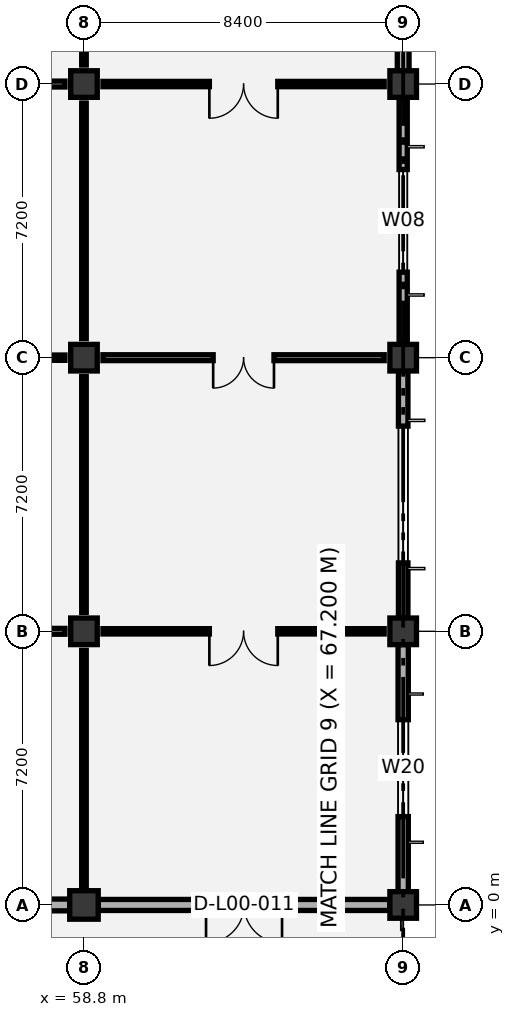
"""IFC4 building model, lengths in metres.
Left out: names, types, materials, properties, quantities, classifications, styles, units other than length and angle.
Written with IfcOpenShell. Run it as: python <this file> out.ifc"""

import sys

from ifc_helpers import new_model, si_unit, direction, frame, frame_2d, origin, origin_2d, place, context, subcontext, project, spatial, rectangle, circle, extrude, element, fill, save


model = new_model("IFC4")
c1 = context("Model", 3, precision=1e-05, world=origin(), true_north=direction((0.0, 1.0)))
c2 = subcontext(c1, "Body", "Model", "MODEL_VIEW")
j1 = project(units=[si_unit("LENGTHUNIT", "METRE"), si_unit("PLANEANGLEUNIT", "RADIAN")], contexts=[c1])
p1 = place(None, origin())
s1 = spatial("IfcSite", under=j1, at=p1, CompositionType="ELEMENT")
p2 = place(p1, origin())
s2 = spatial("IfcBuilding", under=s1, at=p2, CompositionType="ELEMENT")
p3 = place(p2, origin())
s3 = spatial("IfcBuildingStorey", under=s2, at=p3, CompositionType="ELEMENT", Elevation=0.0)
p4 = place(p3, frame((58.8, 0.0, 0.0), z_axis=(0.0, 0.0, 1.0), x_axis=(1.0, 0.0, 0.0)))
e1 = element("IfcColumn", 1, at=p4, inside=s3, PredefinedType="COLUMN", context=c2, shape_type="SweptSolid", body=[
    extrude(circle(Radius=0.375, at=origin_2d()), origin(), (0.0, 0.0, 1.0), 6.0),
])
for number, where, z_axis, x_axis in (
    (2, (58.8, 7.2, 0.0), (0.0, 0.0, 1.0), (1.0, 0.0, 0.0)),
    (3, (58.8, 14.4, 0.0), (0.0, 0.0, 1.0), (1.0, 0.0, 0.0)),
    (4, (58.8, 21.6, 0.0), (0.0, 0.0, 1.0), (1.0, 0.0, 0.0)),
    (5, (67.2, 0.0, 0.0), (0.0, 0.0, 1.0), (1.0, 0.0, 0.0)),
    (6, (67.2, 7.2, 0.0), (0.0, 0.0, 1.0), (1.0, 0.0, 0.0)),
    (7, (67.2, 14.4, 0.0), (0.0, 0.0, 1.0), (1.0, 0.0, 0.0)),
    (8, (67.2, 21.6, 0.0), (0.0, 0.0, 1.0), (1.0, 0.0, 0.0)),
):
    element("IfcColumn", number, at=place(p3, frame(where, z_axis=z_axis, x_axis=x_axis)), inside=s3, PredefinedType="COLUMN", context=c2, shape_type="SweptSolid", body=[
        extrude(rectangle(XDim=0.7, YDim=0.7, at=origin_2d()), origin(), (0.0, 0.0, 1.0), 6.0),
    ])
p5 = place(p3, frame((50.75, 0.0, 0.0), z_axis=(0.0, 0.0, 1.0), x_axis=(1.0, 0.0, 0.0)))
e9 = element("IfcWall", 9, at=p5, inside=s3, PredefinedType="SOLIDWALL", context=c2, shape_type="SweptSolid", body=[
    extrude(rectangle(XDim=7.675, YDim=0.31, at=frame_2d((3.837, 0.0))), origin(), (0.0, 0.0, 1.0), 5.02),
])
p6 = place(p5, frame((2.738, 0.0, 0.0)))
e10 = element("IfcOpeningElement", 10, at=p6, cuts=e9, PredefinedType="OPENING", context=c2, shape_type="SweptSolid", body=[
    extrude(rectangle(XDim=2.2, YDim=2.45, at=frame_2d((1.1, 1.225))), frame((0.0, 0.165, 0.0), z_axis=(0.0, -1.0, 0.0), x_axis=(1.0, 0.0, 0.0)), (0.0, 0.0, 1.0), 0.33),
])
p7 = place(p3, frame((59.175, 0.0, 0.0), z_axis=(0.0, 0.0, 1.0), x_axis=(1.0, 0.0, 0.0)))
e11 = element("IfcWall", 11, at=p7, inside=s3, PredefinedType="SOLIDWALL", context=c2, shape_type="SweptSolid", body=[
    extrude(rectangle(XDim=7.675, YDim=0.29, at=frame_2d((3.837, 0.0))), origin(), (0.0, 0.0, 1.0), 5.02),
])
p8 = place(p7, frame((2.837, 0.0, 0.0)))
e12 = element("IfcOpeningElement", 12, at=p8, cuts=e11, PredefinedType="OPENING", context=c2, shape_type="SweptSolid", body=[
    extrude(rectangle(XDim=2.0, YDim=2.4, at=frame_2d((1.0, 1.2))), frame((0.0, 0.155, 0.0), z_axis=(0.0, -1.0, 0.0), x_axis=(1.0, 0.0, 0.0)), (0.0, 0.0, 1.0), 0.31),
])
p9 = place(p3, frame((67.2, 0.35, 0.0), z_axis=(0.0, 0.0, 1.0), x_axis=(0.0, 1.0, 0.0)))
e13 = element("IfcWall", 13, at=p9, inside=s3, PredefinedType="SOLIDWALL", context=c2, shape_type="SweptSolid", body=[
    extrude(rectangle(XDim=6.5, YDim=0.27, at=frame_2d((3.25, 0.0))), origin(), (0.0, 0.0, 1.0), 5.02),
])
p10 = place(p9, frame((1.975, 0.0, 0.9)))
e14 = element("IfcOpeningElement", 14, at=p10, cuts=e13, PredefinedType="OPENING", context=c2, shape_type="SweptSolid", body=[
    extrude(rectangle(XDim=2.55, YDim=1.95, at=frame_2d((1.275, 0.975))), frame((0.0, 0.145, 0.0), z_axis=(0.0, -1.0, 0.0), x_axis=(1.0, 0.0, 0.0)), (0.0, 0.0, 1.0), 0.29),
])
p11 = place(p3, frame((67.2, 7.55, 0.0), z_axis=(0.0, 0.0, 1.0), x_axis=(0.0, 1.0, 0.0)))
e15 = element("IfcWall", 15, at=p11, inside=s3, PredefinedType="SOLIDWALL", context=c2, shape_type="SweptSolid", body=[
    extrude(rectangle(XDim=6.5, YDim=0.25, at=frame_2d((3.25, 0.0))), origin(), (0.0, 0.0, 1.0), 5.02),
])
p12 = place(p11, frame((1.45, 0.0, 0.9)))
e16 = element("IfcOpeningElement", 16, at=p12, cuts=e15, PredefinedType="OPENING", context=c2, shape_type="SweptSolid", body=[
    extrude(rectangle(XDim=3.6, YDim=2.4, at=frame_2d((1.8, 1.2))), frame((0.0, 0.135, 0.0), z_axis=(0.0, -1.0, 0.0), x_axis=(1.0, 0.0, 0.0)), (0.0, 0.0, 1.0), 0.27),
])
p13 = place(p3, frame((67.2, 14.75, 0.0), z_axis=(0.0, 0.0, 1.0), x_axis=(0.0, 1.0, 0.0)))
e17 = element("IfcWall", 17, at=p13, inside=s3, PredefinedType="SOLIDWALL", context=c2, shape_type="SweptSolid", body=[
    extrude(rectangle(XDim=6.5, YDim=0.215, at=frame_2d((3.25, 0.0))), origin(), (0.0, 0.0, 1.0), 5.02),
])
p14 = place(p13, frame((1.9, 0.0, 0.9)))
e18 = element("IfcOpeningElement", 18, at=p14, cuts=e17, PredefinedType="OPENING", context=c2, shape_type="SweptSolid", body=[
    extrude(rectangle(XDim=2.7, YDim=2.1, at=frame_2d((1.35, 1.05))), frame((0.0, 0.117, 0.0), z_axis=(0.0, -1.0, 0.0), x_axis=(1.0, 0.0, 0.0)), (0.0, 0.0, 1.0), 0.235),
])
p15 = place(p3, frame((67.2, 21.95, 0.0), z_axis=(0.0, 0.0, 1.0), x_axis=(0.0, 1.0, 0.0)))
e19 = element("IfcWall", 19, at=p15, inside=s3, PredefinedType="SOLIDWALL", context=c2, shape_type="SweptSolid", body=[
    extrude(rectangle(XDim=6.5, YDim=0.31, at=frame_2d((3.25, 0.0))), origin(), (0.0, 0.0, 1.0), 5.02),
])
p16 = place(p15, frame((1.825, 0.0, 0.9)))
e20 = element("IfcOpeningElement", 20, at=p16, cuts=e19, PredefinedType="OPENING", context=c2, shape_type="SweptSolid", body=[
    extrude(rectangle(XDim=2.85, YDim=1.95, at=frame_2d((1.425, 0.975))), frame((0.0, 0.165, 0.0), z_axis=(0.0, -1.0, 0.0), x_axis=(1.0, 0.0, 0.0)), (0.0, 0.0, 1.0), 0.33),
])
p17 = place(p3, frame((58.8, 0.5, 0.0), z_axis=(0.0, 0.0, 1.0), x_axis=(0.0, 1.0, 0.0)))
e21 = element("IfcWall", 21, at=p17, inside=s3, PredefinedType="PARTITIONING", context=c2, shape_type="SweptSolid", body=[
    extrude(rectangle(XDim=6.2, YDim=0.12, at=frame_2d((3.1, 0.0))), origin(), (0.0, 0.0, 1.0), 4.92),
])
p18 = place(p3, frame((50.9, 7.2, 0.0), z_axis=(0.0, 0.0, 1.0), x_axis=(1.0, 0.0, 0.0)))
e22 = element("IfcWall", 22, at=p18, inside=s3, PredefinedType="PARTITIONING", context=c2, shape_type="SweptSolid", body=[
    extrude(rectangle(XDim=7.4, YDim=0.155, at=frame_2d((3.7, 0.0))), origin(), (0.0, 0.0, 1.0), 4.87),
])
p19 = place(p18, frame((2.8, 0.0, 0.0)))
e23 = element("IfcOpeningElement", 23, at=p19, cuts=e22, PredefinedType="OPENING", context=c2, shape_type="SweptSolid", body=[
    extrude(rectangle(XDim=1.8, YDim=2.25, at=frame_2d((0.9, 1.125))), frame((0.0, 0.087, 0.0), z_axis=(0.0, -1.0, 0.0), x_axis=(1.0, 0.0, 0.0)), (0.0, 0.0, 1.0), 0.175),
])
p20 = place(p3, frame((58.8, 7.7, 0.0), z_axis=(0.0, 0.0, 1.0), x_axis=(0.0, 1.0, 0.0)))
e24 = element("IfcWall", 24, at=p20, inside=s3, PredefinedType="PARTITIONING", context=c2, shape_type="SweptSolid", body=[
    extrude(rectangle(XDim=6.2, YDim=0.12, at=frame_2d((3.1, 0.0))), origin(), (0.0, 0.0, 1.0), 5.38),
])
p21 = place(p3, frame((50.9, 14.4, 0.0), z_axis=(0.0, 0.0, 1.0), x_axis=(1.0, 0.0, 0.0)))
e25 = element("IfcWall", 25, at=p21, inside=s3, PredefinedType="PARTITIONING", context=c2, shape_type="SweptSolid", body=[
    extrude(rectangle(XDim=7.4, YDim=0.14, at=frame_2d((3.7, 0.0))), origin(), (0.0, 0.0, 1.0), 4.87),
])
p22 = place(p21, frame((2.9, 0.0, 0.0)))
e26 = element("IfcOpeningElement", 26, at=p22, cuts=e25, PredefinedType="OPENING", context=c2, shape_type="SweptSolid", body=[
    extrude(rectangle(XDim=1.6, YDim=2.2, at=frame_2d((0.8, 1.1))), frame((0.0, 0.08, 0.0), z_axis=(0.0, -1.0, 0.0), x_axis=(1.0, 0.0, 0.0)), (0.0, 0.0, 1.0), 0.16),
])
p23 = place(p3, frame((58.8, 14.9, 0.0), z_axis=(0.0, 0.0, 1.0), x_axis=(0.0, 1.0, 0.0)))
e27 = element("IfcWall", 27, at=p23, inside=s3, PredefinedType="PARTITIONING", context=c2, shape_type="SweptSolid", body=[
    extrude(rectangle(XDim=6.2, YDim=0.12, at=frame_2d((3.1, 0.0))), origin(), (0.0, 0.0, 1.0), 4.92),
])
p24 = place(p3, frame((50.9, 21.6, 0.0), z_axis=(0.0, 0.0, 1.0), x_axis=(1.0, 0.0, 0.0)))
e28 = element("IfcWall", 28, at=p24, inside=s3, PredefinedType="PARTITIONING", context=c2, shape_type="SweptSolid", body=[
    extrude(rectangle(XDim=7.4, YDim=0.155, at=frame_2d((3.7, 0.0))), origin(), (0.0, 0.0, 1.0), 4.87),
])
p25 = place(p24, frame((2.8, 0.0, 0.0)))
e29 = element("IfcOpeningElement", 29, at=p25, cuts=e28, PredefinedType="OPENING", context=c2, shape_type="SweptSolid", body=[
    extrude(rectangle(XDim=1.8, YDim=2.25, at=frame_2d((0.9, 1.125))), frame((0.0, 0.087, 0.0), z_axis=(0.0, -1.0, 0.0), x_axis=(1.0, 0.0, 0.0)), (0.0, 0.0, 1.0), 0.175),
])
p26 = place(p3, frame((58.8, 22.1, 0.0), z_axis=(0.0, 0.0, 1.0), x_axis=(0.0, 1.0, 0.0)))
e30 = element("IfcWall", 30, at=p26, inside=s3, PredefinedType="PARTITIONING", context=c2, shape_type="SweptSolid", body=[
    extrude(rectangle(XDim=6.2, YDim=0.12, at=frame_2d((3.1, 0.0))), origin(), (0.0, 0.0, 1.0), 5.17),
])
p27 = place(p3, frame((59.3, 7.2, 0.0), z_axis=(0.0, 0.0, 1.0), x_axis=(1.0, 0.0, 0.0)))
e31 = element("IfcWall", 31, at=p27, inside=s3, PredefinedType="PARTITIONING", context=c2, shape_type="SweptSolid", body=[
    extrude(rectangle(XDim=7.4, YDim=0.14, at=frame_2d((3.7, 0.0))), origin(), (0.0, 0.0, 1.0), 4.87),
])
p28 = place(p27, frame((2.8, 0.0, 0.0)))
e32 = element("IfcOpeningElement", 32, at=p28, cuts=e31, PredefinedType="OPENING", context=c2, shape_type="SweptSolid", body=[
    extrude(rectangle(XDim=1.8, YDim=2.25, at=frame_2d((0.9, 1.125))), frame((0.0, 0.08, 0.0), z_axis=(0.0, -1.0, 0.0), x_axis=(1.0, 0.0, 0.0)), (0.0, 0.0, 1.0), 0.16),
])
p29 = place(p3, frame((59.3, 14.4, 0.0), z_axis=(0.0, 0.0, 1.0), x_axis=(1.0, 0.0, 0.0)))
e33 = element("IfcWall", 33, at=p29, inside=s3, PredefinedType="PARTITIONING", context=c2, shape_type="SweptSolid", body=[
    extrude(rectangle(XDim=7.4, YDim=0.155, at=frame_2d((3.7, 0.0))), origin(), (0.0, 0.0, 1.0), 4.87),
])
p30 = place(p29, frame((2.9, 0.0, 0.0)))
e34 = element("IfcOpeningElement", 34, at=p30, cuts=e33, PredefinedType="OPENING", context=c2, shape_type="SweptSolid", body=[
    extrude(rectangle(XDim=1.6, YDim=2.2, at=frame_2d((0.8, 1.1))), frame((0.0, 0.087, 0.0), z_axis=(0.0, -1.0, 0.0), x_axis=(1.0, 0.0, 0.0)), (0.0, 0.0, 1.0), 0.175),
])
p31 = place(p3, frame((59.3, 21.6, 0.0), z_axis=(0.0, 0.0, 1.0), x_axis=(1.0, 0.0, 0.0)))
e35 = element("IfcWall", 35, at=p31, inside=s3, PredefinedType="PARTITIONING", context=c2, shape_type="SweptSolid", body=[
    extrude(rectangle(XDim=7.4, YDim=0.14, at=frame_2d((3.7, 0.0))), origin(), (0.0, 0.0, 1.0), 4.87),
])
p32 = place(p31, frame((2.8, 0.0, 0.0)))
e36 = element("IfcOpeningElement", 36, at=p32, cuts=e35, PredefinedType="OPENING", context=c2, shape_type="SweptSolid", body=[
    extrude(rectangle(XDim=1.8, YDim=2.25, at=frame_2d((0.9, 1.125))), frame((0.0, 0.08, 0.0), z_axis=(0.0, -1.0, 0.0), x_axis=(1.0, 0.0, 0.0)), (0.0, 0.0, 1.0), 0.16),
])
p33 = place(p8, frame((2.0, 0.0, 0.0), z_axis=(0.0, 0.0, 1.0), x_axis=(-1.0, 0.0, 0.0)))
e37 = element("IfcDoor", 37, at=p33, inside=s3, OperationType="DOUBLE_DOOR_SINGLE_SWING", PredefinedType="DOOR", context=c2, shape_type="SweptSolid", body=[
    extrude(rectangle(XDim=2.0, YDim=2.4, at=frame_2d((1.0, 1.2))), frame((0.0, 0.025, 0.0), z_axis=(0.0, -1.0, 0.0), x_axis=(1.0, 0.0, 0.0)), (0.0, 0.0, 1.0), 0.05),
])
fill(e12, e37)
p34 = place(p10, origin())
e38 = element("IfcWindow", 38, at=p34, inside=s3, PartitioningType="SINGLE_PANEL", PredefinedType="WINDOW", context=c2, shape_type="SweptSolid", body=[
    extrude(rectangle(XDim=2.55, YDim=1.95, at=frame_2d((1.275, 0.975))), frame((0.0, 0.03, 0.0), z_axis=(0.0, -1.0, 0.0), x_axis=(1.0, 0.0, 0.0)), (0.0, 0.0, 1.0), 0.06),
])
fill(e14, e38)
p35 = place(p12, origin())
e39 = element("IfcWindow", 39, at=p35, inside=s3, PartitioningType="SINGLE_PANEL", PredefinedType="WINDOW", context=c2, shape_type="SweptSolid", body=[
    extrude(rectangle(XDim=3.6, YDim=2.4, at=frame_2d((1.8, 1.2))), frame((0.0, 0.03, 0.0), z_axis=(0.0, -1.0, 0.0), x_axis=(1.0, 0.0, 0.0)), (0.0, 0.0, 1.0), 0.06),
])
fill(e16, e39)
p36 = place(p14, origin())
e40 = element("IfcWindow", 40, at=p36, inside=s3, PartitioningType="SINGLE_PANEL", PredefinedType="WINDOW", context=c2, shape_type="SweptSolid", body=[
    extrude(rectangle(XDim=2.7, YDim=2.1, at=frame_2d((1.35, 1.05))), frame((0.0, 0.03, 0.0), z_axis=(0.0, -1.0, 0.0), x_axis=(1.0, 0.0, 0.0)), (0.0, 0.0, 1.0), 0.06),
])
fill(e18, e40)
p37 = place(p28, frame((1.8, 0.0, 0.0), z_axis=(0.0, 0.0, 1.0), x_axis=(-1.0, 0.0, 0.0)))
e41 = element("IfcDoor", 41, at=p37, inside=s3, OperationType="DOUBLE_DOOR_SINGLE_SWING", PredefinedType="DOOR", context=c2, shape_type="SweptSolid", body=[
    extrude(rectangle(XDim=1.8, YDim=2.25, at=frame_2d((0.9, 1.125))), frame((0.0, 0.025, 0.0), z_axis=(0.0, -1.0, 0.0), x_axis=(1.0, 0.0, 0.0)), (0.0, 0.0, 1.0), 0.05),
])
fill(e32, e41)
p38 = place(p30, frame((1.6, 0.0, 0.0), z_axis=(0.0, 0.0, 1.0), x_axis=(-1.0, 0.0, 0.0)))
e42 = element("IfcDoor", 42, at=p38, inside=s3, OperationType="DOUBLE_DOOR_SINGLE_SWING", PredefinedType="DOOR", context=c2, shape_type="SweptSolid", body=[
    extrude(rectangle(XDim=1.6, YDim=2.2, at=frame_2d((0.8, 1.1))), frame((0.0, 0.025, 0.0), z_axis=(0.0, -1.0, 0.0), x_axis=(1.0, 0.0, 0.0)), (0.0, 0.0, 1.0), 0.05),
])
fill(e34, e42)
p39 = place(p32, frame((1.8, 0.0, 0.0), z_axis=(0.0, 0.0, 1.0), x_axis=(-1.0, 0.0, 0.0)))
e43 = element("IfcDoor", 43, at=p39, inside=s3, OperationType="DOUBLE_DOOR_SINGLE_SWING", PredefinedType="DOOR", context=c2, shape_type="SweptSolid", body=[
    extrude(rectangle(XDim=1.8, YDim=2.25, at=frame_2d((0.9, 1.125))), frame((0.0, 0.025, 0.0), z_axis=(0.0, -1.0, 0.0), x_axis=(1.0, 0.0, 0.0)), (0.0, 0.0, 1.0), 0.05),
])
fill(e36, e43)
save(model, sys.argv[1])
